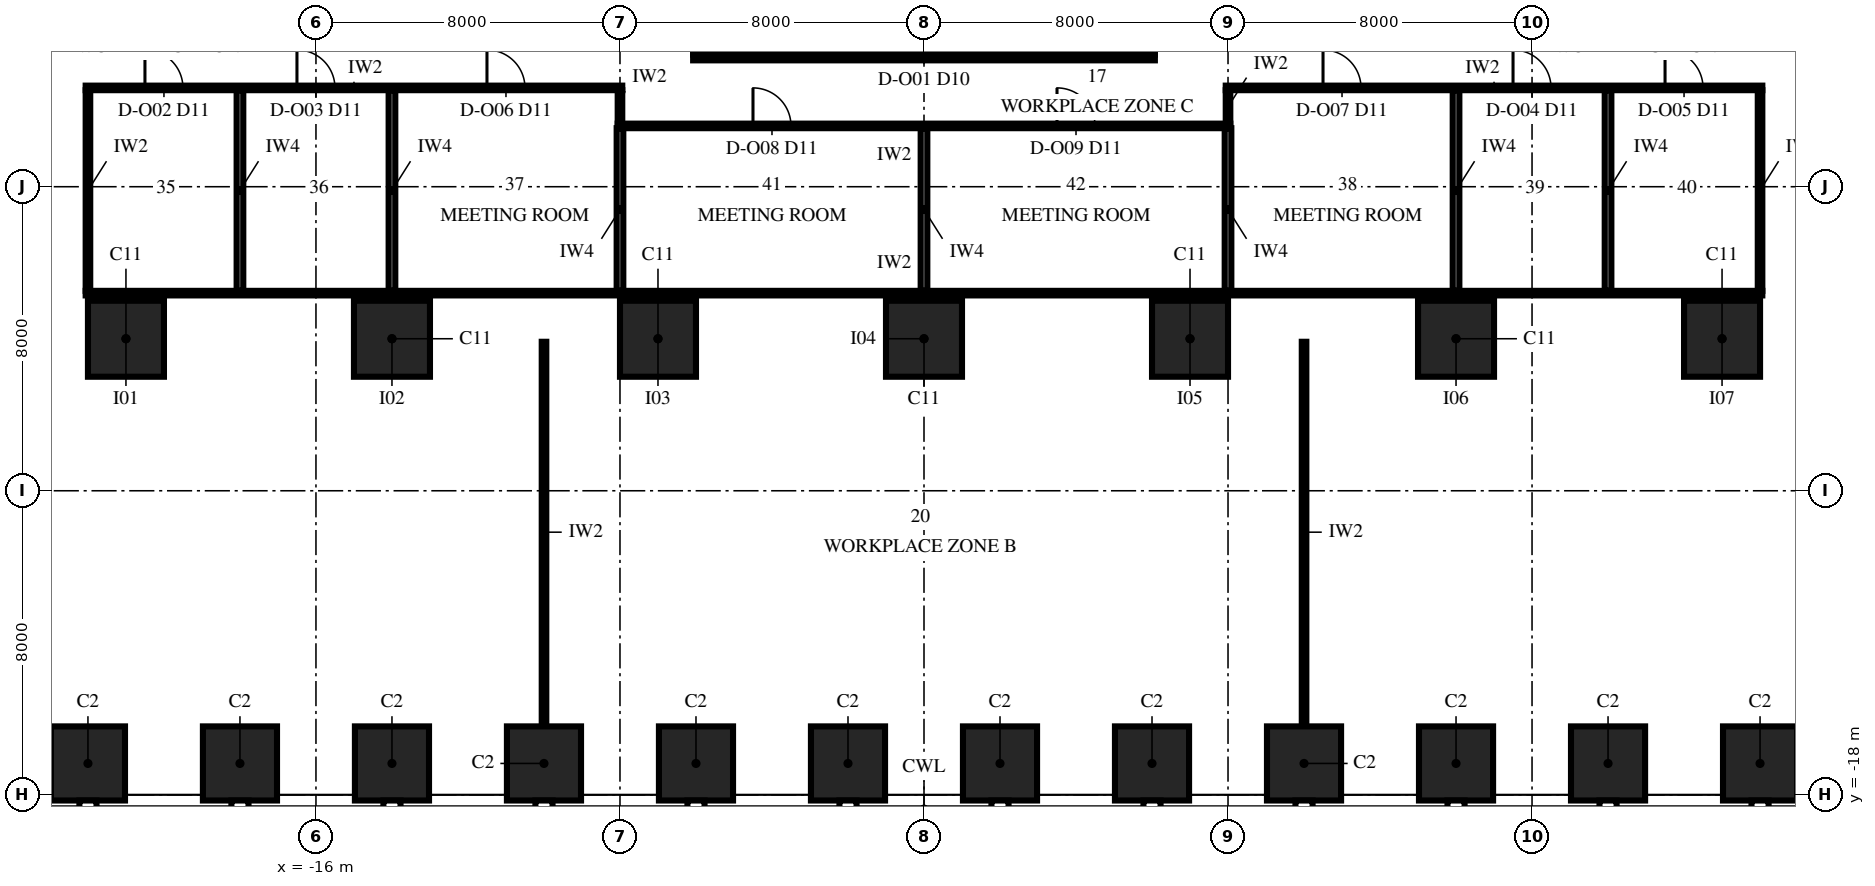
"""IFC4 building model, lengths in metres.
Left out: names, types, materials, properties, quantities, classifications, styles, units other than length and angle.
Written with IfcOpenShell. Run it as: python <this file> out.ifc"""

import sys

from ifc_helpers import new_model, si_unit, direction, frame, frame_2d, origin, origin_2d, place, context, subcontext, project, spatial, rectangle, extrude, element, fill, save


model = new_model("IFC4")
c1 = context("Model", 3, precision=1e-05, world=origin(), true_north=direction((0.0, 1.0)))
c2 = subcontext(c1, "Body", "Model", "MODEL_VIEW")
j1 = project(units=[si_unit("LENGTHUNIT", "METRE"), si_unit("PLANEANGLEUNIT", "RADIAN")], contexts=[c1])
p1 = place(None, origin())
s1 = spatial("IfcSite", under=j1, at=p1, CompositionType="ELEMENT")
p2 = place(p1, origin())
s2 = spatial("IfcBuilding", under=s1, at=p2, CompositionType="ELEMENT")
p3 = place(p2, frame((0.0, 0.0, 72.0)))
s3 = spatial("IfcBuildingStorey", under=s2, at=p3, CompositionType="ELEMENT", Elevation=72.0)
for number, where, z_axis, x_axis in (
    (1, (-22.0, -17.175, 0.0), (0.0, 0.0, 1.0), (1.0, 0.0, 0.0)),
    (2, (-18.0, -17.175, 0.0), (0.0, 0.0, 1.0), (1.0, 0.0, 0.0)),
    (3, (-14.0, -17.175, 0.0), (0.0, 0.0, 1.0), (1.0, 0.0, 0.0)),
    (4, (-10.0, -17.175, 0.0), (0.0, 0.0, 1.0), (1.0, 0.0, 0.0)),
    (5, (-6.0, -17.175, 0.0), (0.0, 0.0, 1.0), (1.0, 0.0, 0.0)),
    (6, (-2.0, -17.175, 0.0), (0.0, 0.0, 1.0), (1.0, 0.0, 0.0)),
    (7, (2.0, -17.175, 0.0), (0.0, 0.0, 1.0), (1.0, 0.0, 0.0)),
    (8, (6.0, -17.175, 0.0), (0.0, 0.0, 1.0), (1.0, 0.0, 0.0)),
    (9, (10.0, -17.175, 0.0), (0.0, 0.0, 1.0), (1.0, 0.0, 0.0)),
    (10, (14.0, -17.175, 0.0), (0.0, 0.0, 1.0), (1.0, 0.0, 0.0)),
    (11, (18.0, -17.175, 0.0), (0.0, 0.0, 1.0), (1.0, 0.0, 0.0)),
    (12, (22.0, -17.175, 0.0), (0.0, 0.0, 1.0), (1.0, 0.0, 0.0)),
):
    element("IfcColumn", number, at=place(p3, frame(where, z_axis=z_axis, x_axis=x_axis)), inside=s3, PredefinedType="COLUMN", context=c2, shape_type="SweptSolid", body=[
        extrude(rectangle(XDim=1.95, YDim=1.95, at=origin_2d()), origin(), (0.0, 0.0, 1.0), 4.0),
    ])
for number, where, z_axis, x_axis in (
    (13, (-21.0, -6.0, 0.0), (0.0, 0.0, 1.0), (1.0, 0.0, 0.0)),
    (14, (-14.0, -6.0, 0.0), (0.0, 0.0, 1.0), (1.0, 0.0, 0.0)),
    (15, (-7.0, -6.0, 0.0), (0.0, 0.0, 1.0), (1.0, 0.0, 0.0)),
    (16, (0.0, -6.0, 0.0), (0.0, 0.0, 1.0), (1.0, 0.0, 0.0)),
    (17, (7.0, -6.0, 0.0), (0.0, 0.0, 1.0), (1.0, 0.0, 0.0)),
    (18, (14.0, -6.0, 0.0), (0.0, 0.0, 1.0), (1.0, 0.0, 0.0)),
    (19, (21.0, -6.0, 0.0), (0.0, 0.0, 1.0), (1.0, 0.0, 0.0)),
):
    element("IfcColumn", number, at=place(p3, frame(where, z_axis=z_axis, x_axis=x_axis)), inside=s3, PredefinedType="COLUMN", context=c2, shape_type="SweptSolid", body=[
        extrude(rectangle(XDim=2.0, YDim=2.0, at=origin_2d()), origin(), (0.0, 0.0, 1.0), 4.0),
    ])
p4 = place(p3, frame((-22.06, -4.8, 0.0), z_axis=(0.0, 0.0, 1.0), x_axis=(1.0, 0.0, 0.0)))
e20 = element("IfcWall", 20, at=p4, inside=s3, PredefinedType="PARTITIONING", context=c2, shape_type="SweptSolid", body=[
    extrude(rectangle(XDim=44.12, YDim=0.12, at=frame_2d((22.06, 0.0))), origin(), (0.0, 0.0, 1.0), 3.25),
])
p5 = place(p3, frame((-8.06, -0.4, 0.0), z_axis=(0.0, 0.0, 1.0), x_axis=(1.0, 0.0, 0.0)))
e21 = element("IfcWall", 21, at=p5, inside=s3, PredefinedType="PARTITIONING", context=c2, shape_type="SweptSolid", body=[
    extrude(rectangle(XDim=16.12, YDim=0.12, at=frame_2d((8.06, 0.0))), origin(), (0.0, 0.0, 1.0), 3.25),
])
p6 = place(p5, frame((3.56, 0.0, 0.0)))
e22 = element("IfcOpeningElement", 22, at=p6, cuts=e21, PredefinedType="OPENING", context=c2, shape_type="SweptSolid", body=[
    extrude(rectangle(XDim=1.0, YDim=2.4, at=frame_2d((0.5, 1.2))), frame((0.0, 0.075, 0.0), z_axis=(0.0, -1.0, 0.0), x_axis=(1.0, 0.0, 0.0)), (0.0, 0.0, 1.0), 0.15),
])
p7 = place(p5, frame((11.56, 0.0, 0.0)))
e23 = element("IfcOpeningElement", 23, at=p7, cuts=e21, PredefinedType="OPENING", context=c2, shape_type="SweptSolid", body=[
    extrude(rectangle(XDim=1.0, YDim=2.4, at=frame_2d((0.5, 1.2))), frame((0.0, 0.075, 0.0), z_axis=(0.0, -1.0, 0.0), x_axis=(1.0, 0.0, 0.0)), (0.0, 0.0, 1.0), 0.15),
])
p8 = place(p3, frame((-22.06, 0.6, 0.0), z_axis=(0.0, 0.0, 1.0), x_axis=(1.0, 0.0, 0.0)))
e24 = element("IfcWall", 24, at=p8, inside=s3, PredefinedType="PARTITIONING", context=c2, shape_type="SweptSolid", body=[
    extrude(rectangle(XDim=14.12, YDim=0.12, at=frame_2d((7.06, 0.0))), origin(), (0.0, 0.0, 1.0), 3.25),
])
p9 = place(p8, frame((1.56, 0.0, 0.0)))
e25 = element("IfcOpeningElement", 25, at=p9, cuts=e24, PredefinedType="OPENING", context=c2, shape_type="SweptSolid", body=[
    extrude(rectangle(XDim=1.0, YDim=2.4, at=frame_2d((0.5, 1.2))), frame((0.0, 0.075, 0.0), z_axis=(0.0, -1.0, 0.0), x_axis=(1.0, 0.0, 0.0)), (0.0, 0.0, 1.0), 0.15),
])
p10 = place(p8, frame((5.56, 0.0, 0.0)))
e26 = element("IfcOpeningElement", 26, at=p10, cuts=e24, PredefinedType="OPENING", context=c2, shape_type="SweptSolid", body=[
    extrude(rectangle(XDim=1.0, YDim=2.4, at=frame_2d((0.5, 1.2))), frame((0.0, 0.075, 0.0), z_axis=(0.0, -1.0, 0.0), x_axis=(1.0, 0.0, 0.0)), (0.0, 0.0, 1.0), 0.15),
])
p11 = place(p8, frame((10.56, 0.0, 0.0)))
e27 = element("IfcOpeningElement", 27, at=p11, cuts=e24, PredefinedType="OPENING", context=c2, shape_type="SweptSolid", body=[
    extrude(rectangle(XDim=1.0, YDim=2.4, at=frame_2d((0.5, 1.2))), frame((0.0, 0.075, 0.0), z_axis=(0.0, -1.0, 0.0), x_axis=(1.0, 0.0, 0.0)), (0.0, 0.0, 1.0), 0.15),
])
p12 = place(p3, frame((7.94, 0.6, 0.0), z_axis=(0.0, 0.0, 1.0), x_axis=(1.0, 0.0, 0.0)))
e28 = element("IfcWall", 28, at=p12, inside=s3, PredefinedType="PARTITIONING", context=c2, shape_type="SweptSolid", body=[
    extrude(rectangle(XDim=14.12, YDim=0.12, at=frame_2d((7.06, 0.0))), origin(), (0.0, 0.0, 1.0), 3.25),
])
p13 = place(p12, frame((7.56, 0.0, 0.0)))
e29 = element("IfcOpeningElement", 29, at=p13, cuts=e28, PredefinedType="OPENING", context=c2, shape_type="SweptSolid", body=[
    extrude(rectangle(XDim=1.0, YDim=2.4, at=frame_2d((0.5, 1.2))), frame((0.0, 0.075, 0.0), z_axis=(0.0, -1.0, 0.0), x_axis=(1.0, 0.0, 0.0)), (0.0, 0.0, 1.0), 0.15),
])
p14 = place(p12, frame((11.56, 0.0, 0.0)))
e30 = element("IfcOpeningElement", 30, at=p14, cuts=e28, PredefinedType="OPENING", context=c2, shape_type="SweptSolid", body=[
    extrude(rectangle(XDim=1.0, YDim=2.4, at=frame_2d((0.5, 1.2))), frame((0.0, 0.075, 0.0), z_axis=(0.0, -1.0, 0.0), x_axis=(1.0, 0.0, 0.0)), (0.0, 0.0, 1.0), 0.15),
])
p15 = place(p12, frame((2.56, 0.0, 0.0)))
e31 = element("IfcOpeningElement", 31, at=p15, cuts=e28, PredefinedType="OPENING", context=c2, shape_type="SweptSolid", body=[
    extrude(rectangle(XDim=1.0, YDim=2.4, at=frame_2d((0.5, 1.2))), frame((0.0, 0.075, 0.0), z_axis=(0.0, -1.0, 0.0), x_axis=(1.0, 0.0, 0.0)), (0.0, 0.0, 1.0), 0.15),
])
p16 = place(p3, frame((-6.075, 1.4, 0.0), z_axis=(0.0, 0.0, 1.0), x_axis=(1.0, 0.0, 0.0)))
e32 = element("IfcWall", 32, at=p16, inside=s3, PredefinedType="PARTITIONING", context=c2, shape_type="SweptSolid", body=[
    extrude(rectangle(XDim=12.15, YDim=0.15, at=frame_2d((6.075, 0.0))), origin(), (0.0, 0.0, 1.0), 3.25),
])
p17 = place(p16, frame((5.575, 0.0, 0.0)))
e33 = element("IfcOpeningElement", 33, at=p17, cuts=e32, PredefinedType="OPENING", context=c2, shape_type="SweptSolid", body=[
    extrude(rectangle(XDim=1.0, YDim=2.3, at=frame_2d((0.5, 1.15))), frame((0.0, 0.09, 0.0), z_axis=(0.0, -1.0, 0.0), x_axis=(1.0, 0.0, 0.0)), (0.0, 0.0, 1.0), 0.18),
])
p18 = place(p3, frame((-22.0, -4.74, 0.0), z_axis=(0.0, 0.0, 1.0), x_axis=(0.0, 1.0, 0.0)))
e34 = element("IfcWall", 34, at=p18, inside=s3, PredefinedType="PARTITIONING", context=c2, shape_type="SweptSolid", body=[
    extrude(rectangle(XDim=5.28, YDim=0.12, at=frame_2d((2.64, 0.0))), origin(), (0.0, 0.0, 1.0), 3.25),
])
for number, where, z_axis, x_axis in (
    (35, (-18.0, -4.74, 0.0), (0.0, 0.0, 1.0), (0.0, 1.0, 0.0)),
    (36, (-14.0, -4.74, 0.0), (0.0, 0.0, 1.0), (0.0, 1.0, 0.0)),
):
    element("IfcWall", number, at=place(p3, frame(where, z_axis=z_axis, x_axis=x_axis)), inside=s3, PredefinedType="PARTITIONING", context=c2, shape_type="SweptSolid", body=[
        extrude(rectangle(XDim=5.28, YDim=0.175, at=frame_2d((2.64, 0.0))), origin(), (0.0, 0.0, 1.0), 3.25),
    ])
p19 = place(p3, frame((-8.0, -4.74, 0.0), z_axis=(0.0, 0.0, 1.0), x_axis=(0.0, 1.0, 0.0)))
e37 = element("IfcWall", 37, at=p19, inside=s3, PredefinedType="PARTITIONING", context=c2, shape_type="SweptSolid", body=[
    extrude(rectangle(XDim=4.28, YDim=0.175, at=frame_2d((2.14, 0.0))), origin(), (0.0, 0.0, 1.0), 3.85),
])
p20 = place(p3, frame((-8.0, -0.34, 0.0), z_axis=(0.0, 0.0, 1.0), x_axis=(0.0, 1.0, 0.0)))
e38 = element("IfcWall", 38, at=p20, inside=s3, PredefinedType="PARTITIONING", context=c2, shape_type="SweptSolid", body=[
    extrude(rectangle(XDim=0.88, YDim=0.12, at=frame_2d((0.44, 0.0))), origin(), (0.0, 0.0, 1.0), 3.85),
])
p21 = place(p3, frame((-6.0, 1.475, 0.0), z_axis=(0.0, 0.0, 1.0), x_axis=(0.0, 1.0, 0.0)))
e39 = element("IfcWall", 39, at=p21, inside=s3, PredefinedType="PARTITIONING", context=c2, shape_type="SweptSolid", body=[
    extrude(rectangle(XDim=4.195, YDim=0.15, at=frame_2d((2.097, 0.0))), origin(), (0.0, 0.0, 1.0), 3.85),
])
p22 = place(p3, frame((0.0, -4.74, 0.0), z_axis=(0.0, 0.0, 1.0), x_axis=(0.0, 1.0, 0.0)))
e40 = element("IfcWall", 40, at=p22, inside=s3, PredefinedType="PARTITIONING", context=c2, shape_type="SweptSolid", body=[
    extrude(rectangle(XDim=4.28, YDim=0.175, at=frame_2d((2.14, 0.0))), origin(), (0.0, 0.0, 1.0), 3.85),
])
p23 = place(p3, frame((6.0, 1.475, 0.0), z_axis=(0.0, 0.0, 1.0), x_axis=(0.0, 1.0, 0.0)))
e41 = element("IfcWall", 41, at=p23, inside=s3, PredefinedType="PARTITIONING", context=c2, shape_type="SweptSolid", body=[
    extrude(rectangle(XDim=4.195, YDim=0.15, at=frame_2d((2.097, 0.0))), origin(), (0.0, 0.0, 1.0), 3.85),
])
p24 = place(p3, frame((8.0, -4.74, 0.0), z_axis=(0.0, 0.0, 1.0), x_axis=(0.0, 1.0, 0.0)))
e42 = element("IfcWall", 42, at=p24, inside=s3, PredefinedType="PARTITIONING", context=c2, shape_type="SweptSolid", body=[
    extrude(rectangle(XDim=4.28, YDim=0.175, at=frame_2d((2.14, 0.0))), origin(), (0.0, 0.0, 1.0), 3.85),
])
p25 = place(p3, frame((8.0, -0.34, 0.0), z_axis=(0.0, 0.0, 1.0), x_axis=(0.0, 1.0, 0.0)))
e43 = element("IfcWall", 43, at=p25, inside=s3, PredefinedType="PARTITIONING", context=c2, shape_type="SweptSolid", body=[
    extrude(rectangle(XDim=0.88, YDim=0.12, at=frame_2d((0.44, 0.0))), origin(), (0.0, 0.0, 1.0), 3.85),
])
for number, where, z_axis, x_axis in (
    (44, (14.0, -4.74, 0.0), (0.0, 0.0, 1.0), (0.0, 1.0, 0.0)),
    (45, (18.0, -4.74, 0.0), (0.0, 0.0, 1.0), (0.0, 1.0, 0.0)),
):
    element("IfcWall", number, at=place(p3, frame(where, z_axis=z_axis, x_axis=x_axis)), inside=s3, PredefinedType="PARTITIONING", context=c2, shape_type="SweptSolid", body=[
        extrude(rectangle(XDim=5.28, YDim=0.175, at=frame_2d((2.64, 0.0))), origin(), (0.0, 0.0, 1.0), 3.25),
    ])
p26 = place(p3, frame((22.0, -4.74, 0.0), z_axis=(0.0, 0.0, 1.0), x_axis=(0.0, 1.0, 0.0)))
e46 = element("IfcWall", 46, at=p26, inside=s3, PredefinedType="PARTITIONING", context=c2, shape_type="SweptSolid", body=[
    extrude(rectangle(XDim=5.28, YDim=0.12, at=frame_2d((2.64, 0.0))), origin(), (0.0, 0.0, 1.0), 3.25),
])
for number, where, z_axis, x_axis in (
    (47, (-9.999, -16.1, 0.0), (0.0, 0.0, 1.0), (0.0, 1.0, 0.0)),
    (48, (10.001, -16.1, 0.0), (0.0, 0.0, 1.0), (0.0, 1.0, 0.0)),
):
    element("IfcWall", number, at=place(p3, frame(where, z_axis=z_axis, x_axis=x_axis)), inside=s3, PredefinedType="PARTITIONING", context=c2, shape_type="SweptSolid", body=[
        extrude(rectangle(XDim=10.02, YDim=0.12, at=frame_2d((5.01, 0.0))), origin(), (0.0, 0.0, 1.0), 2.842),
    ])
p27 = place(p17, origin())
e49 = element("IfcDoor", 49, at=p27, inside=s3, OperationType="SINGLE_SWING_LEFT", PredefinedType="DOOR", context=c2, shape_type="SweptSolid", body=[
    extrude(rectangle(XDim=1.0, YDim=2.3, at=frame_2d((0.5, 1.15))), frame((0.0, 0.075, 0.0), z_axis=(0.0, -1.0, 0.0), x_axis=(1.0, 0.0, 0.0)), (0.0, 0.0, 1.0), 0.149),
])
fill(e33, e49)
p28 = place(p9, origin())
e50 = element("IfcDoor", 50, at=p28, inside=s3, OperationType="SINGLE_SWING_RIGHT", PredefinedType="DOOR", context=c2, shape_type="SweptSolid", body=[
    extrude(rectangle(XDim=1.0, YDim=2.4, at=frame_2d((0.5, 1.2))), frame((0.0, 0.06, 0.0), z_axis=(0.0, -1.0, 0.0), x_axis=(1.0, 0.0, 0.0)), (0.0, 0.0, 1.0), 0.12),
])
fill(e25, e50)
p29 = place(p10, origin())
e51 = element("IfcDoor", 51, at=p29, inside=s3, OperationType="SINGLE_SWING_RIGHT", PredefinedType="DOOR", context=c2, shape_type="SweptSolid", body=[
    extrude(rectangle(XDim=1.0, YDim=2.4, at=frame_2d((0.5, 1.2))), frame((0.0, 0.06, 0.0), z_axis=(0.0, -1.0, 0.0), x_axis=(1.0, 0.0, 0.0)), (0.0, 0.0, 1.0), 0.12),
])
fill(e26, e51)
p30 = place(p13, origin())
e52 = element("IfcDoor", 52, at=p30, inside=s3, OperationType="SINGLE_SWING_RIGHT", PredefinedType="DOOR", context=c2, shape_type="SweptSolid", body=[
    extrude(rectangle(XDim=1.0, YDim=2.4, at=frame_2d((0.5, 1.2))), frame((0.0, 0.06, 0.0), z_axis=(0.0, -1.0, 0.0), x_axis=(1.0, 0.0, 0.0)), (0.0, 0.0, 1.0), 0.12),
])
fill(e29, e52)
p31 = place(p14, origin())
e53 = element("IfcDoor", 53, at=p31, inside=s3, OperationType="SINGLE_SWING_RIGHT", PredefinedType="DOOR", context=c2, shape_type="SweptSolid", body=[
    extrude(rectangle(XDim=1.0, YDim=2.4, at=frame_2d((0.5, 1.2))), frame((0.0, 0.06, 0.0), z_axis=(0.0, -1.0, 0.0), x_axis=(1.0, 0.0, 0.0)), (0.0, 0.0, 1.0), 0.12),
])
fill(e30, e53)
p32 = place(p11, origin())
e54 = element("IfcDoor", 54, at=p32, inside=s3, OperationType="SINGLE_SWING_RIGHT", PredefinedType="DOOR", context=c2, shape_type="SweptSolid", body=[
    extrude(rectangle(XDim=1.0, YDim=2.4, at=frame_2d((0.5, 1.2))), frame((0.0, 0.06, 0.0), z_axis=(0.0, -1.0, 0.0), x_axis=(1.0, 0.0, 0.0)), (0.0, 0.0, 1.0), 0.12),
])
fill(e27, e54)
p33 = place(p15, origin())
e55 = element("IfcDoor", 55, at=p33, inside=s3, OperationType="SINGLE_SWING_RIGHT", PredefinedType="DOOR", context=c2, shape_type="SweptSolid", body=[
    extrude(rectangle(XDim=1.0, YDim=2.4, at=frame_2d((0.5, 1.2))), frame((0.0, 0.06, 0.0), z_axis=(0.0, -1.0, 0.0), x_axis=(1.0, 0.0, 0.0)), (0.0, 0.0, 1.0), 0.12),
])
fill(e31, e55)
p34 = place(p6, origin())
e56 = element("IfcDoor", 56, at=p34, inside=s3, OperationType="SINGLE_SWING_RIGHT", PredefinedType="DOOR", context=c2, shape_type="SweptSolid", body=[
    extrude(rectangle(XDim=1.0, YDim=2.4, at=frame_2d((0.5, 1.2))), frame((0.0, 0.06, 0.0), z_axis=(0.0, -1.0, 0.0), x_axis=(1.0, 0.0, 0.0)), (0.0, 0.0, 1.0), 0.12),
])
fill(e22, e56)
p35 = place(p7, origin())
e57 = element("IfcDoor", 57, at=p35, inside=s3, OperationType="SINGLE_SWING_RIGHT", PredefinedType="DOOR", context=c2, shape_type="SweptSolid", body=[
    extrude(rectangle(XDim=1.0, YDim=2.4, at=frame_2d((0.5, 1.2))), frame((0.0, 0.06, 0.0), z_axis=(0.0, -1.0, 0.0), x_axis=(1.0, 0.0, 0.0)), (0.0, 0.0, 1.0), 0.12),
])
fill(e23, e57)
save(model, sys.argv[1])
